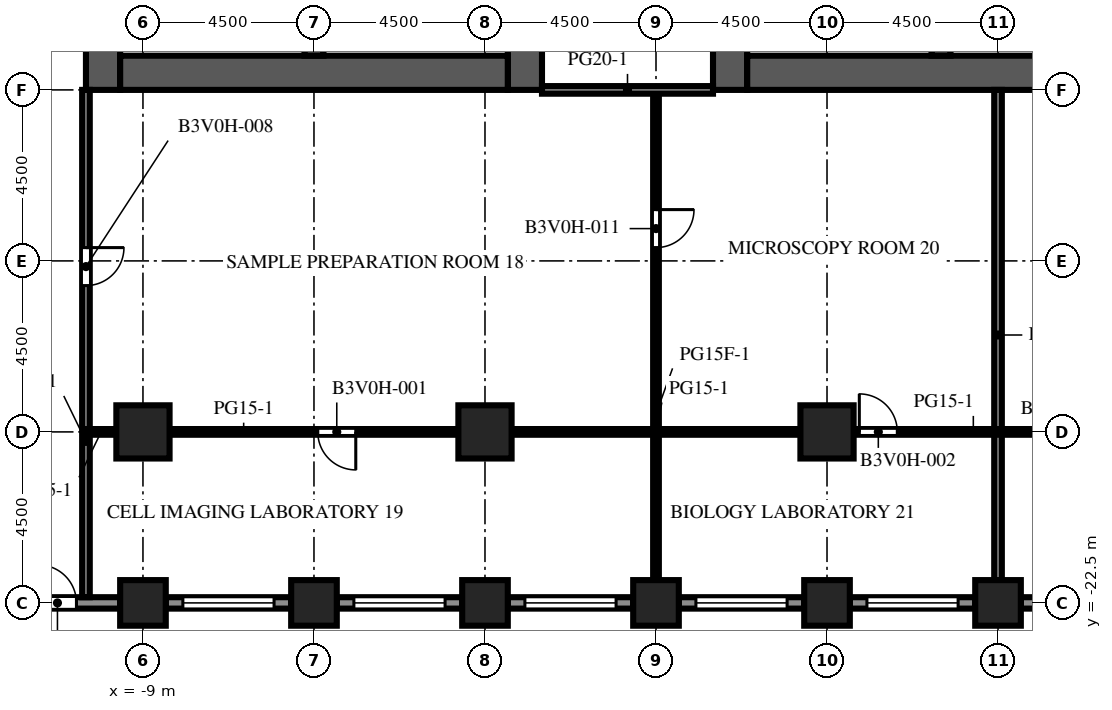
"""IFC4 building model, lengths in metres.
Left out: names, types, materials, properties, quantities, classifications, styles, units other than length and angle.
Written with IfcOpenShell. Run it as: python <this file> out.ifc"""

import sys

from ifc_helpers import new_model, si_unit, direction, frame, frame_2d, origin, origin_2d, place, context, subcontext, project, spatial, rectangle, extrude, element, fill, save


model = new_model("IFC4")
c1 = context("Model", 3, precision=1e-05, world=origin(), true_north=direction((0.0, 1.0)))
c2 = subcontext(c1, "Body", "Model", "MODEL_VIEW")
j1 = project(units=[si_unit("LENGTHUNIT", "METRE"), si_unit("PLANEANGLEUNIT", "RADIAN")], contexts=[c1])
p1 = place(None, origin())
s1 = spatial("IfcSite", under=j1, at=p1, CompositionType="ELEMENT")
p2 = place(p1, origin())
s2 = spatial("IfcBuilding", under=s1, at=p2, CompositionType="ELEMENT")
p3 = place(p2, frame((0.0, 0.0, 82.0)))
s3 = spatial("IfcBuildingStorey", under=s2, at=p3, CompositionType="ELEMENT", Elevation=82.0)
for number, where, z_axis, x_axis in (
    (1, (-9.0, -22.5, 0.0), (0.0, 0.0, 1.0), (1.0, 0.0, 0.0)),
    (2, (-4.5, -22.5, 0.0), (0.0, 0.0, 1.0), (1.0, 0.0, 0.0)),
    (3, (0.0, -22.5, 0.0), (0.0, 0.0, 1.0), (1.0, 0.0, 0.0)),
    (4, (4.5, -22.5, 0.0), (0.0, 0.0, 1.0), (1.0, 0.0, 0.0)),
    (5, (9.0, -22.5, 0.0), (0.0, 0.0, 1.0), (1.0, 0.0, 0.0)),
    (6, (13.5, -22.5, 0.0), (0.0, 0.0, 1.0), (1.0, 0.0, 0.0)),
):
    element("IfcColumn", number, at=place(p3, frame(where, z_axis=z_axis, x_axis=x_axis)), inside=s3, PredefinedType="COLUMN", context=c2, shape_type="SweptSolid", body=[
        extrude(rectangle(XDim=1.2, YDim=1.2, at=origin_2d()), origin(), (0.0, 0.0, 1.0), 4.1),
    ])
for number, where, z_axis, x_axis in (
    (7, (-9.0, -18.0, 0.0), (0.0, 0.0, 1.0), (1.0, 0.0, 0.0)),
    (8, (0.0, -18.0, 0.0), (0.0, 0.0, 1.0), (1.0, 0.0, 0.0)),
    (9, (9.0, -18.0, 0.0), (0.0, 0.0, 1.0), (1.0, 0.0, 0.0)),
):
    element("IfcColumn", number, at=place(p3, frame(where, z_axis=z_axis, x_axis=x_axis)), inside=s3, PredefinedType="COLUMN", context=c2, shape_type="SweptSolid", body=[
        extrude(rectangle(XDim=1.4, YDim=1.4, at=origin_2d()), origin(), (0.0, 0.0, 1.0), 4.1),
    ])
p4 = place(p3, frame((-10.05, -9.0, 0.0), z_axis=(0.0, 0.0, 1.0), x_axis=(0.0, 1.0, 0.0)))
e10 = element("IfcWall", 10, at=p4, inside=s3, PredefinedType="SHEAR", context=c2, shape_type="SweptSolid", body=[
    extrude(rectangle(XDim=27.5, YDim=0.9, at=frame_2d((13.75, 0.0))), origin(), (0.0, 0.0, 1.0), 4.1),
])
p5 = place(p4, frame((12.55, 0.0, 0.0)))
e11 = element("IfcOpeningElement", 11, at=p5, cuts=e10, PredefinedType="OPENING", context=c2, shape_type="SweptSolid", body=[
    extrude(rectangle(XDim=2.4, YDim=2.4, at=frame_2d((1.2, 1.2))), frame((0.0, 0.46, 0.0), z_axis=(0.0, -1.0, 0.0), x_axis=(1.0, 0.0, 0.0)), (0.0, 0.0, 1.0), 0.92),
])
p6 = place(p4, frame((6.825, 0.0, 0.0)))
e12 = element("IfcOpeningElement", 12, at=p6, cuts=e10, PredefinedType="OPENING", context=c2, shape_type="SweptSolid", body=[
    extrude(rectangle(XDim=1.2, YDim=2.1, at=frame_2d((0.6, 1.05))), frame((0.0, 0.46, 0.0), z_axis=(0.0, -1.0, 0.0), x_axis=(1.0, 0.0, 0.0)), (0.0, 0.0, 1.0), 0.92),
])
p7 = place(p4, frame((19.475, 0.0, 0.0)))
e13 = element("IfcOpeningElement", 13, at=p7, cuts=e10, PredefinedType="OPENING", context=c2, shape_type="SweptSolid", body=[
    extrude(rectangle(XDim=1.2, YDim=2.1, at=frame_2d((0.6, 1.05))), frame((0.0, 0.46, 0.0), z_axis=(0.0, -1.0, 0.0), x_axis=(1.0, 0.0, 0.0)), (0.0, 0.0, 1.0), 0.92),
])
p8 = place(p3, frame((1.05, -9.0, 0.0), z_axis=(0.0, 0.0, 1.0), x_axis=(0.0, 1.0, 0.0)))
e14 = element("IfcWall", 14, at=p8, inside=s3, PredefinedType="SHEAR", context=c2, shape_type="SweptSolid", body=[
    extrude(rectangle(XDim=27.5, YDim=0.9, at=frame_2d((13.75, 0.0))), origin(), (0.0, 0.0, 1.0), 4.1),
])
p9 = place(p8, frame((12.55, 0.0, 0.0)))
e15 = element("IfcOpeningElement", 15, at=p9, cuts=e14, PredefinedType="OPENING", context=c2, shape_type="SweptSolid", body=[
    extrude(rectangle(XDim=2.4, YDim=2.4, at=frame_2d((1.2, 1.2))), frame((0.0, 0.46, 0.0), z_axis=(0.0, -1.0, 0.0), x_axis=(1.0, 0.0, 0.0)), (0.0, 0.0, 1.0), 0.92),
])
p10 = place(p8, frame((5.445, 0.0, 0.0)))
e16 = element("IfcOpeningElement", 16, at=p10, cuts=e14, PredefinedType="OPENING", context=c2, shape_type="SweptSolid", body=[
    extrude(rectangle(XDim=1.2, YDim=2.1, at=frame_2d((0.6, 1.05))), frame((0.0, 0.46, 0.0), z_axis=(0.0, -1.0, 0.0), x_axis=(1.0, 0.0, 0.0)), (0.0, 0.0, 1.0), 0.92),
])
p11 = place(p8, frame((19.485, 0.0, 0.0)))
e17 = element("IfcOpeningElement", 17, at=p11, cuts=e14, PredefinedType="OPENING", context=c2, shape_type="SweptSolid", body=[
    extrude(rectangle(XDim=1.0, YDim=2.1, at=frame_2d((0.5, 1.05))), frame((0.0, 0.46, 0.0), z_axis=(0.0, -1.0, 0.0), x_axis=(1.0, 0.0, 0.0)), (0.0, 0.0, 1.0), 0.92),
])
p12 = place(p8, frame((21.139, 0.0, 0.0)))
e18 = element("IfcOpeningElement", 18, at=p12, cuts=e14, PredefinedType="OPENING", context=c2, shape_type="SweptSolid", body=[
    extrude(rectangle(XDim=1.0, YDim=2.1, at=frame_2d((0.5, 1.05))), frame((0.0, 0.46, 0.0), z_axis=(0.0, -1.0, 0.0), x_axis=(1.0, 0.0, 0.0)), (0.0, 0.0, 1.0), 0.92),
])
p13 = place(p8, frame((23.16, 0.0, 0.0)))
e19 = element("IfcOpeningElement", 19, at=p13, cuts=e14, PredefinedType="OPENING", context=c2, shape_type="SweptSolid", body=[
    extrude(rectangle(XDim=1.0, YDim=2.1, at=frame_2d((0.5, 1.05))), frame((0.0, 0.46, 0.0), z_axis=(0.0, -1.0, 0.0), x_axis=(1.0, 0.0, 0.0)), (0.0, 0.0, 1.0), 0.92),
])
p14 = place(p8, frame((25.181, 0.0, 0.0)))
e20 = element("IfcOpeningElement", 20, at=p14, cuts=e14, PredefinedType="OPENING", context=c2, shape_type="SweptSolid", body=[
    extrude(rectangle(XDim=1.0, YDim=2.1, at=frame_2d((0.5, 1.05))), frame((0.0, 0.46, 0.0), z_axis=(0.0, -1.0, 0.0), x_axis=(1.0, 0.0, 0.0)), (0.0, 0.0, 1.0), 0.92),
])
p15 = place(p3, frame((-9.6, -8.55, 0.0), z_axis=(0.0, 0.0, 1.0), x_axis=(1.0, 0.0, 0.0)))
e21 = element("IfcWall", 21, at=p15, inside=s3, PredefinedType="SHEAR", context=c2, shape_type="SweptSolid", body=[
    extrude(rectangle(XDim=10.2, YDim=0.9, at=frame_2d((5.1, 0.0))), origin(), (0.0, 0.0, 1.0), 4.1),
])
p16 = place(p3, frame((-4.5, -8.1, 0.0), z_axis=(0.0, 0.0, 1.0), x_axis=(0.0, 1.0, 0.0)))
e22 = element("IfcWall", 22, at=p16, inside=s3, PredefinedType="SHEAR", context=c2, shape_type="SweptSolid", body=[
    extrude(rectangle(XDim=7.35, YDim=0.5, at=frame_2d((3.675, 0.0))), origin(), (0.0, 0.0, 1.0), 4.1),
])
p17 = place(p3, frame((6.45, -9.0, 0.0), z_axis=(0.0, 0.0, 1.0), x_axis=(0.0, 1.0, 0.0)))
e23 = element("IfcWall", 23, at=p17, inside=s3, PredefinedType="SHEAR", context=c2, shape_type="SweptSolid", body=[
    extrude(rectangle(XDim=27.5, YDim=0.9, at=frame_2d((13.75, 0.0))), origin(), (0.0, 0.0, 1.0), 4.1),
])
p18 = place(p17, frame((12.55, 0.0, 0.0)))
e24 = element("IfcOpeningElement", 24, at=p18, cuts=e23, PredefinedType="OPENING", context=c2, shape_type="SweptSolid", body=[
    extrude(rectangle(XDim=2.4, YDim=2.4, at=frame_2d((1.2, 1.2))), frame((0.0, 0.46, 0.0), z_axis=(0.0, -1.0, 0.0), x_axis=(1.0, 0.0, 0.0)), (0.0, 0.0, 1.0), 0.92),
])
p19 = place(p17, frame((5.445, 0.0, 0.0)))
e25 = element("IfcOpeningElement", 25, at=p19, cuts=e23, PredefinedType="OPENING", context=c2, shape_type="SweptSolid", body=[
    extrude(rectangle(XDim=1.2, YDim=2.1, at=frame_2d((0.6, 1.05))), frame((0.0, 0.46, 0.0), z_axis=(0.0, -1.0, 0.0), x_axis=(1.0, 0.0, 0.0)), (0.0, 0.0, 1.0), 0.92),
])
p20 = place(p17, frame((19.485, 0.0, 0.0)))
e26 = element("IfcOpeningElement", 26, at=p20, cuts=e23, PredefinedType="OPENING", context=c2, shape_type="SweptSolid", body=[
    extrude(rectangle(XDim=1.0, YDim=2.1, at=frame_2d((0.5, 1.05))), frame((0.0, 0.46, 0.0), z_axis=(0.0, -1.0, 0.0), x_axis=(1.0, 0.0, 0.0)), (0.0, 0.0, 1.0), 0.92),
])
p21 = place(p17, frame((21.139, 0.0, 0.0)))
e27 = element("IfcOpeningElement", 27, at=p21, cuts=e23, PredefinedType="OPENING", context=c2, shape_type="SweptSolid", body=[
    extrude(rectangle(XDim=1.0, YDim=2.1, at=frame_2d((0.5, 1.05))), frame((0.0, 0.46, 0.0), z_axis=(0.0, -1.0, 0.0), x_axis=(1.0, 0.0, 0.0)), (0.0, 0.0, 1.0), 0.92),
])
p22 = place(p17, frame((23.16, 0.0, 0.0)))
e28 = element("IfcOpeningElement", 28, at=p22, cuts=e23, PredefinedType="OPENING", context=c2, shape_type="SweptSolid", body=[
    extrude(rectangle(XDim=1.0, YDim=2.1, at=frame_2d((0.5, 1.05))), frame((0.0, 0.46, 0.0), z_axis=(0.0, -1.0, 0.0), x_axis=(1.0, 0.0, 0.0)), (0.0, 0.0, 1.0), 0.92),
])
p23 = place(p17, frame((25.181, 0.0, 0.0)))
e29 = element("IfcOpeningElement", 29, at=p23, cuts=e23, PredefinedType="OPENING", context=c2, shape_type="SweptSolid", body=[
    extrude(rectangle(XDim=1.0, YDim=2.1, at=frame_2d((0.5, 1.05))), frame((0.0, 0.46, 0.0), z_axis=(0.0, -1.0, 0.0), x_axis=(1.0, 0.0, 0.0)), (0.0, 0.0, 1.0), 0.92),
])
p24 = place(p3, frame((6.9, -8.55, 0.0), z_axis=(0.0, 0.0, 1.0), x_axis=(1.0, 0.0, 0.0)))
e30 = element("IfcWall", 30, at=p24, inside=s3, PredefinedType="SHEAR", context=c2, shape_type="SweptSolid", body=[
    extrude(rectangle(XDim=10.2, YDim=0.9, at=frame_2d((5.1, 0.0))), origin(), (0.0, 0.0, 1.0), 4.1),
])
p25 = place(p3, frame((12.0, -8.1, 0.0), z_axis=(0.0, 0.0, 1.0), x_axis=(0.0, 1.0, 0.0)))
e31 = element("IfcWall", 31, at=p25, inside=s3, PredefinedType="SHEAR", context=c2, shape_type="SweptSolid", body=[
    extrude(rectangle(XDim=7.35, YDim=0.5, at=frame_2d((3.675, 0.0))), origin(), (0.0, 0.0, 1.0), 4.1),
])
p26 = place(p3, frame((-9.6, -22.5, 0.0), z_axis=(0.0, 0.0, 1.0), x_axis=(-1.0, 0.0, 0.0)))
e32 = element("IfcWall", 32, at=p26, inside=s3, PredefinedType="SOLIDWALL", context=c2, shape_type="SweptSolid", body=[
    extrude(rectangle(XDim=3.3, YDim=0.3, at=frame_2d((1.65, 0.0))), origin(), (0.0, 0.0, 1.0), 2.75),
])
p27 = place(p26, frame((1.15, 0.0, 0.0)))
e33 = element("IfcOpeningElement", 33, at=p27, cuts=e32, PredefinedType="OPENING", context=c2, shape_type="SweptSolid", body=[
    extrude(rectangle(XDim=1.0, YDim=2.2, at=frame_2d((0.5, 1.1))), frame((0.0, 0.16, 0.0), z_axis=(0.0, -1.0, 0.0), x_axis=(1.0, 0.0, 0.0)), (0.0, 0.0, 1.0), 0.32),
])
p28 = place(p3, frame((-5.1, -22.5, 0.0), z_axis=(0.0, 0.0, 1.0), x_axis=(-1.0, 0.0, 0.0)))
e34 = element("IfcWall", 34, at=p28, inside=s3, PredefinedType="SOLIDWALL", context=c2, shape_type="SweptSolid", body=[
    extrude(rectangle(XDim=3.3, YDim=0.3, at=frame_2d((1.65, 0.0))), origin(), (0.0, 0.0, 1.0), 2.75),
])
p29 = place(p28, frame((0.45, 0.0, 0.8)))
e35 = element("IfcOpeningElement", 35, at=p29, cuts=e34, PredefinedType="OPENING", context=c2, shape_type="SweptSolid", body=[
    extrude(rectangle(XDim=2.4, YDim=1.7, at=frame_2d((1.2, 0.85))), frame((0.0, 0.16, 0.0), z_axis=(0.0, -1.0, 0.0), x_axis=(1.0, 0.0, 0.0)), (0.0, 0.0, 1.0), 0.32),
])
p30 = place(p3, frame((-0.6, -22.5, 0.0), z_axis=(0.0, 0.0, 1.0), x_axis=(-1.0, 0.0, 0.0)))
e36 = element("IfcWall", 36, at=p30, inside=s3, PredefinedType="SOLIDWALL", context=c2, shape_type="SweptSolid", body=[
    extrude(rectangle(XDim=3.3, YDim=0.3, at=frame_2d((1.65, 0.0))), origin(), (0.0, 0.0, 1.0), 2.75),
])
p31 = place(p30, frame((0.45, 0.0, 0.8)))
e37 = element("IfcOpeningElement", 37, at=p31, cuts=e36, PredefinedType="OPENING", context=c2, shape_type="SweptSolid", body=[
    extrude(rectangle(XDim=2.4, YDim=1.7, at=frame_2d((1.2, 0.85))), frame((0.0, 0.16, 0.0), z_axis=(0.0, -1.0, 0.0), x_axis=(1.0, 0.0, 0.0)), (0.0, 0.0, 1.0), 0.32),
])
p32 = place(p3, frame((3.9, -22.5, 0.0), z_axis=(0.0, 0.0, 1.0), x_axis=(-1.0, 0.0, 0.0)))
e38 = element("IfcWall", 38, at=p32, inside=s3, PredefinedType="SOLIDWALL", context=c2, shape_type="SweptSolid", body=[
    extrude(rectangle(XDim=3.3, YDim=0.3, at=frame_2d((1.65, 0.0))), origin(), (0.0, 0.0, 1.0), 2.75),
])
p33 = place(p32, frame((0.45, 0.0, 0.8)))
e39 = element("IfcOpeningElement", 39, at=p33, cuts=e38, PredefinedType="OPENING", context=c2, shape_type="SweptSolid", body=[
    extrude(rectangle(XDim=2.4, YDim=1.7, at=frame_2d((1.2, 0.85))), frame((0.0, 0.16, 0.0), z_axis=(0.0, -1.0, 0.0), x_axis=(1.0, 0.0, 0.0)), (0.0, 0.0, 1.0), 0.32),
])
p34 = place(p3, frame((8.4, -22.5, 0.0), z_axis=(0.0, 0.0, 1.0), x_axis=(-1.0, 0.0, 0.0)))
e40 = element("IfcWall", 40, at=p34, inside=s3, PredefinedType="SOLIDWALL", context=c2, shape_type="SweptSolid", body=[
    extrude(rectangle(XDim=3.3, YDim=0.3, at=frame_2d((1.65, 0.0))), origin(), (0.0, 0.0, 1.0), 2.75),
])
p35 = place(p34, frame((0.45, 0.0, 0.8)))
e41 = element("IfcOpeningElement", 41, at=p35, cuts=e40, PredefinedType="OPENING", context=c2, shape_type="SweptSolid", body=[
    extrude(rectangle(XDim=2.4, YDim=1.7, at=frame_2d((1.2, 0.85))), frame((0.0, 0.16, 0.0), z_axis=(0.0, -1.0, 0.0), x_axis=(1.0, 0.0, 0.0)), (0.0, 0.0, 1.0), 0.32),
])
p36 = place(p3, frame((12.9, -22.5, 0.0), z_axis=(0.0, 0.0, 1.0), x_axis=(-1.0, 0.0, 0.0)))
e42 = element("IfcWall", 42, at=p36, inside=s3, PredefinedType="SOLIDWALL", context=c2, shape_type="SweptSolid", body=[
    extrude(rectangle(XDim=3.3, YDim=0.3, at=frame_2d((1.65, 0.0))), origin(), (0.0, 0.0, 1.0), 2.75),
])
p37 = place(p36, frame((0.45, 0.0, 0.8)))
e43 = element("IfcOpeningElement", 43, at=p37, cuts=e42, PredefinedType="OPENING", context=c2, shape_type="SweptSolid", body=[
    extrude(rectangle(XDim=2.4, YDim=1.7, at=frame_2d((1.2, 0.85))), frame((0.0, 0.16, 0.0), z_axis=(0.0, -1.0, 0.0), x_axis=(1.0, 0.0, 0.0)), (0.0, 0.0, 1.0), 0.32),
])
p38 = place(p3, frame((17.4, -22.5, 0.0), z_axis=(0.0, 0.0, 1.0), x_axis=(-1.0, 0.0, 0.0)))
e44 = element("IfcWall", 44, at=p38, inside=s3, PredefinedType="SOLIDWALL", context=c2, shape_type="SweptSolid", body=[
    extrude(rectangle(XDim=3.3, YDim=0.3, at=frame_2d((1.65, 0.0))), origin(), (0.0, 0.0, 1.0), 2.75),
])
p39 = place(p38, frame((0.45, 0.0, 0.8)))
e45 = element("IfcOpeningElement", 45, at=p39, cuts=e44, PredefinedType="OPENING", context=c2, shape_type="SweptSolid", body=[
    extrude(rectangle(XDim=2.4, YDim=1.7, at=frame_2d((1.2, 0.85))), frame((0.0, 0.16, 0.0), z_axis=(0.0, -1.0, 0.0), x_axis=(1.0, 0.0, 0.0)), (0.0, 0.0, 1.0), 0.32),
])
p40 = place(p3, frame((-10.5, -9.0, 0.0), z_axis=(0.0, 0.0, 1.0), x_axis=(0.0, -1.0, 0.0)))
e46 = element("IfcWall", 46, at=p40, inside=s3, PredefinedType="PARTITIONING", context=c2, shape_type="SweptSolid", body=[
    extrude(rectangle(XDim=13.35, YDim=0.2, at=frame_2d((6.675, 0.0))), origin(), (0.0, 0.0, 1.0), 3.65),
])
p41 = place(p40, frame((4.15, 0.0, 0.0)))
e47 = element("IfcOpeningElement", 47, at=p41, cuts=e46, PredefinedType="OPENING", context=c2, shape_type="SweptSolid", body=[
    extrude(rectangle(XDim=1.0, YDim=2.1, at=frame_2d((0.5, 1.05))), frame((0.0, 0.11, 0.0), z_axis=(0.0, -1.0, 0.0), x_axis=(1.0, 0.0, 0.0)), (0.0, 0.0, 1.0), 0.22),
])
p42 = place(p3, frame((4.5, -9.0, 0.0), z_axis=(0.0, 0.0, 1.0), x_axis=(0.0, -1.0, 0.0)))
e48 = element("IfcWall", 48, at=p42, inside=s3, PredefinedType="PARTITIONING", context=c2, shape_type="SweptSolid", body=[
    extrude(rectangle(XDim=12.9, YDim=0.15, at=frame_2d((6.45, 0.0))), origin(), (0.0, 0.0, 1.0), 3.65),
])
p43 = place(p42, frame((3.15, 0.0, 0.0)))
e49 = element("IfcOpeningElement", 49, at=p43, cuts=e48, PredefinedType="OPENING", context=c2, shape_type="SweptSolid", body=[
    extrude(rectangle(XDim=1.0, YDim=2.1, at=frame_2d((0.5, 1.05))), frame((0.0, 0.085, 0.0), z_axis=(0.0, -1.0, 0.0), x_axis=(1.0, 0.0, 0.0)), (0.0, 0.0, 1.0), 0.17),
])
p44 = place(p3, frame((13.5, -21.9, 0.0), z_axis=(0.0, 0.0, 1.0), x_axis=(0.0, 1.0, 0.0)))
e50 = element("IfcWall", 50, at=p44, inside=s3, PredefinedType="PARTITIONING", context=c2, shape_type="SweptSolid", body=[
    extrude(rectangle(XDim=12.9, YDim=0.2, at=frame_2d((6.45, 0.0))), origin(), (0.0, 0.0, 1.0), 3.65),
])
p45 = place(p3, frame((-10.5, -18.0, 0.0), z_axis=(0.0, 0.0, 1.0), x_axis=(1.0, 0.0, 0.0)))
e51 = element("IfcWall", 51, at=p45, inside=s3, PredefinedType="PARTITIONING", context=c2, shape_type="SweptSolid", body=[
    extrude(rectangle(XDim=0.8, YDim=0.15, at=frame_2d((0.4, 0.0))), origin(), (0.0, 0.0, 1.0), 3.65),
])
p46 = place(p3, frame((-0.7, -18.0, 0.0), z_axis=(0.0, 0.0, 1.0), x_axis=(-1.0, 0.0, 0.0)))
e52 = element("IfcWall", 52, at=p46, inside=s3, PredefinedType="PARTITIONING", context=c2, shape_type="SweptSolid", body=[
    extrude(rectangle(XDim=7.6, YDim=0.15, at=frame_2d((3.8, 0.0))), origin(), (0.0, 0.0, 1.0), 3.65),
])
p47 = place(p46, frame((2.7, 0.0, 0.0)))
e53 = element("IfcOpeningElement", 53, at=p47, cuts=e52, PredefinedType="OPENING", context=c2, shape_type="SweptSolid", body=[
    extrude(rectangle(XDim=1.0, YDim=2.1, at=frame_2d((0.5, 1.05))), frame((0.0, 0.085, 0.0), z_axis=(0.0, -1.0, 0.0), x_axis=(1.0, 0.0, 0.0)), (0.0, 0.0, 1.0), 0.17),
])
p48 = place(p3, frame((0.7, -18.0, 0.0), z_axis=(0.0, 0.0, 1.0), x_axis=(1.0, 0.0, 0.0)))
e54 = element("IfcWall", 54, at=p48, inside=s3, PredefinedType="PARTITIONING", context=c2, shape_type="SweptSolid", body=[
    extrude(rectangle(XDim=7.6, YDim=0.15, at=frame_2d((3.8, 0.0))), origin(), (0.0, 0.0, 1.0), 3.65),
])
p49 = place(p3, frame((17.3, -18.0, 0.0), z_axis=(0.0, 0.0, 1.0), x_axis=(-1.0, 0.0, 0.0)))
e55 = element("IfcWall", 55, at=p49, inside=s3, PredefinedType="PARTITIONING", context=c2, shape_type="SweptSolid", body=[
    extrude(rectangle(XDim=7.6, YDim=0.15, at=frame_2d((3.8, 0.0))), origin(), (0.0, 0.0, 1.0), 3.65),
])
p50 = place(p49, frame((6.45, 0.0, 0.0)))
e56 = element("IfcOpeningElement", 56, at=p50, cuts=e55, PredefinedType="OPENING", context=c2, shape_type="SweptSolid", body=[
    extrude(rectangle(XDim=1.0, YDim=2.1, at=frame_2d((0.5, 1.05))), frame((0.0, 0.085, 0.0), z_axis=(0.0, -1.0, 0.0), x_axis=(1.0, 0.0, 0.0)), (0.0, 0.0, 1.0), 0.17),
])
p51 = place(p49, frame((1.45, 0.0, 0.0)))
e57 = element("IfcOpeningElement", 57, at=p51, cuts=e55, PredefinedType="OPENING", context=c2, shape_type="SweptSolid", body=[
    extrude(rectangle(XDim=1.0, YDim=2.1, at=frame_2d((0.5, 1.05))), frame((0.0, 0.085, 0.0), z_axis=(0.0, -1.0, 0.0), x_axis=(1.0, 0.0, 0.0)), (0.0, 0.0, 1.0), 0.17),
])
p52 = place(p3, frame((1.5, -9.0, 0.0), z_axis=(0.0, 0.0, 1.0), x_axis=(1.0, 0.0, 0.0)))
e58 = element("IfcWall", 58, at=p52, inside=s3, PredefinedType="PARTITIONING", context=c2, shape_type="SweptSolid", body=[
    extrude(rectangle(XDim=4.5, YDim=0.2, at=frame_2d((2.25, 0.0))), origin(), (0.0, 0.0, 1.0), 3.65),
])
p53 = place(p27, origin())
e59 = element("IfcDoor", 59, at=p53, inside=s3, OperationType="SINGLE_SWING_RIGHT", PredefinedType="DOOR", context=c2, shape_type="SweptSolid", body=[
    extrude(rectangle(XDim=1.0, YDim=2.2, at=frame_2d((0.5, 1.1))), frame((0.0, 0.025, 0.0), z_axis=(0.0, -1.0, 0.0), x_axis=(1.0, 0.0, 0.0)), (0.0, 0.0, 1.0), 0.05),
])
fill(e33, e59)
p54 = place(p29, origin())
e60 = element("IfcWindow", 60, at=p54, inside=s3, PartitioningType="SINGLE_PANEL", PredefinedType="WINDOW", context=c2, shape_type="SweptSolid", body=[
    extrude(rectangle(XDim=2.4, YDim=1.7, at=frame_2d((1.2, 0.85))), frame((0.0, 0.03, 0.0), z_axis=(0.0, -1.0, 0.0), x_axis=(1.0, 0.0, 0.0)), (0.0, 0.0, 1.0), 0.06),
])
fill(e35, e60)
p55 = place(p31, origin())
e61 = element("IfcWindow", 61, at=p55, inside=s3, PartitioningType="SINGLE_PANEL", PredefinedType="WINDOW", context=c2, shape_type="SweptSolid", body=[
    extrude(rectangle(XDim=2.4, YDim=1.7, at=frame_2d((1.2, 0.85))), frame((0.0, 0.03, 0.0), z_axis=(0.0, -1.0, 0.0), x_axis=(1.0, 0.0, 0.0)), (0.0, 0.0, 1.0), 0.06),
])
fill(e37, e61)
p56 = place(p33, origin())
e62 = element("IfcWindow", 62, at=p56, inside=s3, PartitioningType="SINGLE_PANEL", PredefinedType="WINDOW", context=c2, shape_type="SweptSolid", body=[
    extrude(rectangle(XDim=2.4, YDim=1.7, at=frame_2d((1.2, 0.85))), frame((0.0, 0.03, 0.0), z_axis=(0.0, -1.0, 0.0), x_axis=(1.0, 0.0, 0.0)), (0.0, 0.0, 1.0), 0.06),
])
fill(e39, e62)
p57 = place(p35, origin())
e63 = element("IfcWindow", 63, at=p57, inside=s3, PartitioningType="SINGLE_PANEL", PredefinedType="WINDOW", context=c2, shape_type="SweptSolid", body=[
    extrude(rectangle(XDim=2.4, YDim=1.7, at=frame_2d((1.2, 0.85))), frame((0.0, 0.03, 0.0), z_axis=(0.0, -1.0, 0.0), x_axis=(1.0, 0.0, 0.0)), (0.0, 0.0, 1.0), 0.06),
])
fill(e41, e63)
p58 = place(p37, origin())
e64 = element("IfcWindow", 64, at=p58, inside=s3, PartitioningType="SINGLE_PANEL", PredefinedType="WINDOW", context=c2, shape_type="SweptSolid", body=[
    extrude(rectangle(XDim=2.4, YDim=1.7, at=frame_2d((1.2, 0.85))), frame((0.0, 0.03, 0.0), z_axis=(0.0, -1.0, 0.0), x_axis=(1.0, 0.0, 0.0)), (0.0, 0.0, 1.0), 0.06),
])
fill(e43, e64)
p59 = place(p47, origin())
e65 = element("IfcDoor", 65, at=p59, inside=s3, OperationType="SINGLE_SWING_LEFT", PredefinedType="DOOR", context=c2, shape_type="SweptSolid", body=[
    extrude(rectangle(XDim=1.0, YDim=2.1, at=frame_2d((0.5, 1.05))), frame((0.0, 0.025, 0.0), z_axis=(0.0, -1.0, 0.0), x_axis=(1.0, 0.0, 0.0)), (0.0, 0.0, 1.0), 0.05),
])
fill(e53, e65)
p60 = place(p50, origin())
e66 = element("IfcDoor", 66, at=p60, inside=s3, OperationType="SINGLE_SWING_RIGHT", PredefinedType="DOOR", context=c2, shape_type="SweptSolid", body=[
    extrude(rectangle(XDim=1.0, YDim=2.1, at=frame_2d((0.5, 1.05))), frame((0.0, 0.025, 0.0), z_axis=(0.0, -1.0, 0.0), x_axis=(1.0, 0.0, 0.0)), (0.0, 0.0, 1.0), 0.05),
])
fill(e56, e66)
p61 = place(p41, origin())
e67 = element("IfcDoor", 67, at=p61, inside=s3, OperationType="SINGLE_SWING_LEFT", PredefinedType="DOOR", context=c2, shape_type="SweptSolid", body=[
    extrude(rectangle(XDim=1.0, YDim=2.1, at=frame_2d((0.5, 1.05))), frame((0.0, 0.025, 0.0), z_axis=(0.0, -1.0, 0.0), x_axis=(1.0, 0.0, 0.0)), (0.0, 0.0, 1.0), 0.05),
])
fill(e47, e67)
p62 = place(p43, origin())
e68 = element("IfcDoor", 68, at=p62, inside=s3, OperationType="SINGLE_SWING_LEFT", PredefinedType="DOOR", context=c2, shape_type="SweptSolid", body=[
    extrude(rectangle(XDim=1.0, YDim=2.1, at=frame_2d((0.5, 1.05))), frame((0.0, 0.025, 0.0), z_axis=(0.0, -1.0, 0.0), x_axis=(1.0, 0.0, 0.0)), (0.0, 0.0, 1.0), 0.05),
])
fill(e49, e68)
save(model, sys.argv[1])
